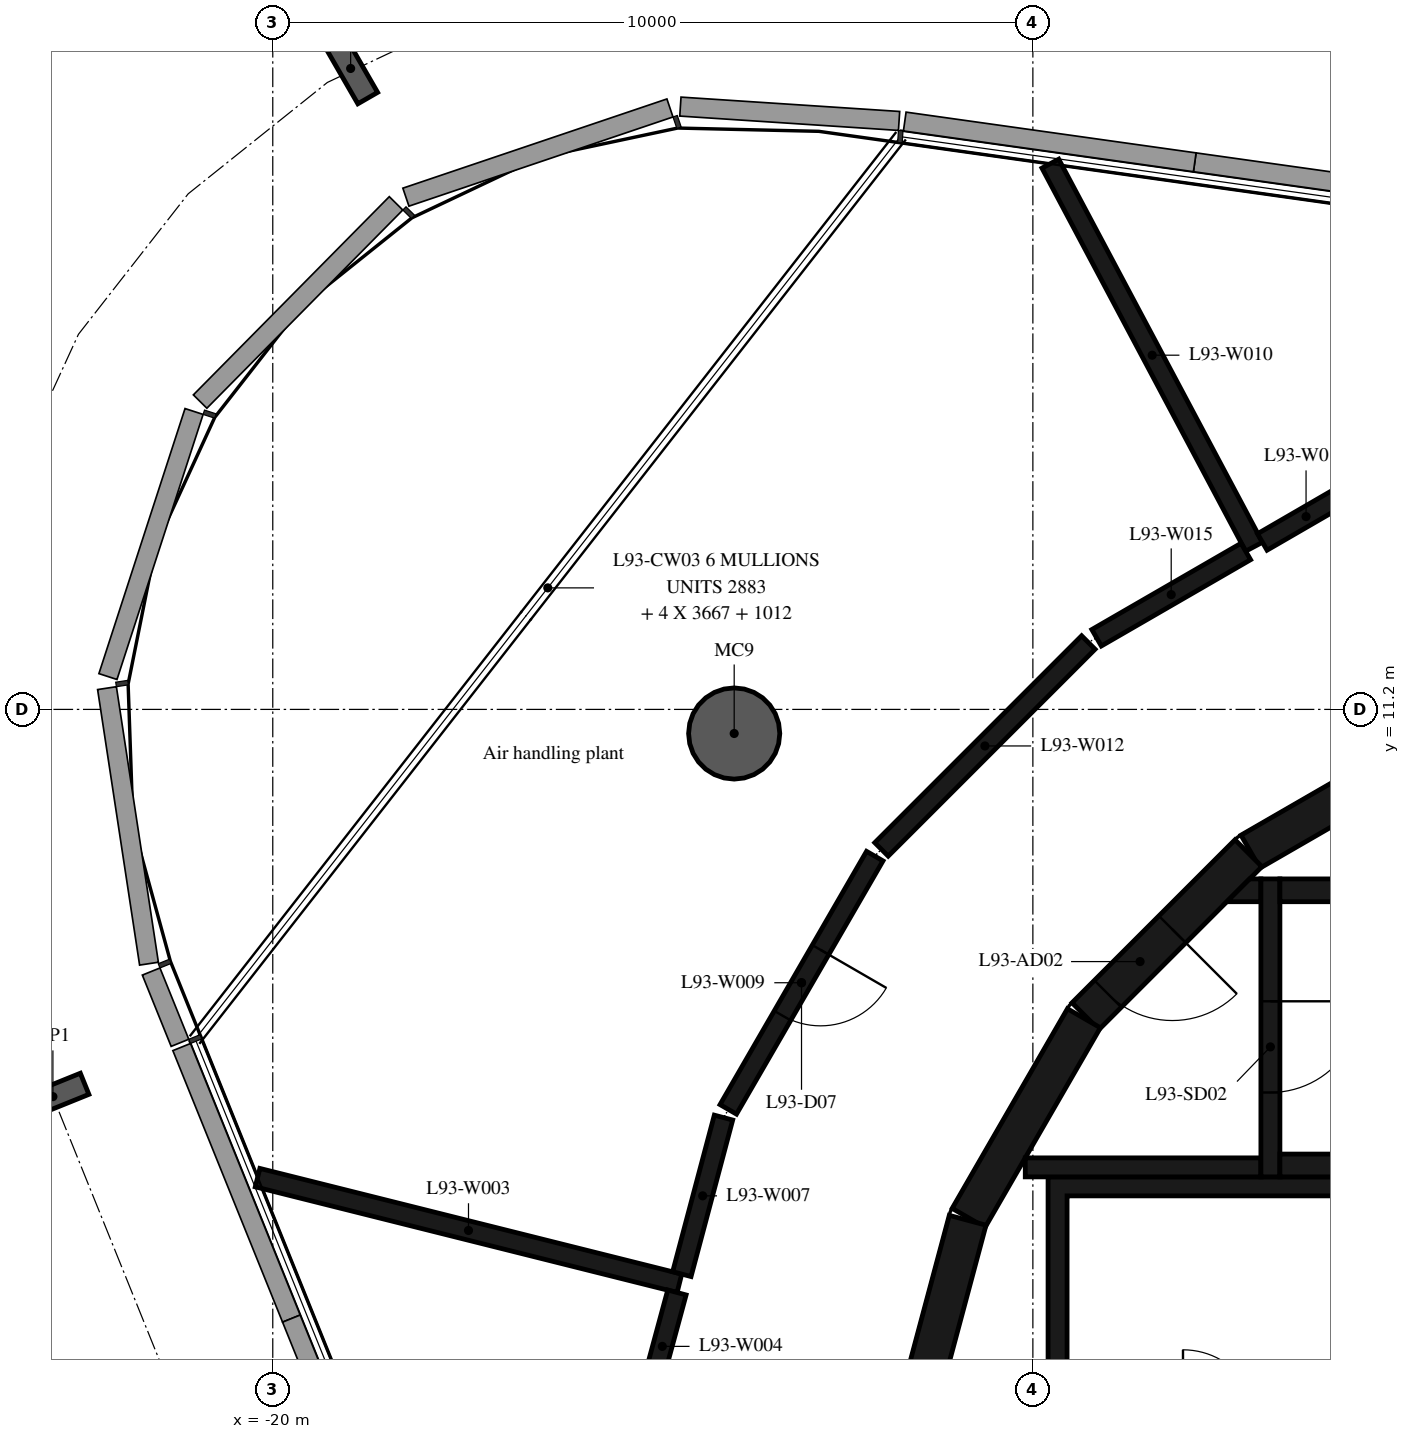
"""IFC4 building model, lengths in metres.
Left out: names, types, materials, properties, quantities, classifications, styles, units other than length and angle.
Written with IfcOpenShell. Run it as: python <this file> out.ifc"""

import sys

from ifc_helpers import new_model, si_unit, direction, frame, frame_2d, origin, origin_2d, place, context, subcontext, project, spatial, polyline, rectangle, hollow_circle, i_section, outline, extrude, element, fill, save


model = new_model("IFC4")
c1 = context("Model", 3, precision=1e-05, world=origin(), true_north=direction((0.0, 1.0)))
c2 = subcontext(c1, "Body", "Model", "MODEL_VIEW")
j1 = project(units=[si_unit("LENGTHUNIT", "METRE"), si_unit("PLANEANGLEUNIT", "RADIAN")], contexts=[c1])
p1 = place(None, origin())
s1 = spatial("IfcSite", under=j1, at=p1, CompositionType="ELEMENT")
p2 = place(p1, origin())
s2 = spatial("IfcBuilding", under=s1, at=p2, CompositionType="ELEMENT")
p3 = place(p2, frame((0.0, 0.0, 361.0)))
s3 = spatial("IfcBuildingStorey", under=s2, at=p3, CompositionType="ELEMENT", Elevation=361.0)
p4 = place(p3, frame((-13.929, 10.883, -0.38), z_axis=(0.0, 0.0, 1.0), x_axis=(1.0, 0.0, 0.0)))
e1 = element("IfcColumn", 1, at=p4, inside=s3, PredefinedType="COLUMN", context=c2, shape_type="SweptSolid", body=[
    extrude(hollow_circle(Radius=0.6, WallThickness=0.03, at=origin_2d()), origin(), (0.0, 0.0, 1.0), 5.2),
])
for number, where, z_axis, x_axis in (
    (2, (-18.976, 19.632, -0.38), (0.0, 0.0, 1.0), (0.866, 0.5, 0.0)),
    (3, (-22.893, 6.106, -0.38), (0.0, 0.0, 1.0), (-0.375, 0.927, 0.0)),
):
    element("IfcColumn", number, at=place(p3, frame(where, z_axis=z_axis, x_axis=x_axis)), inside=s3, PredefinedType="COLUMN", context=c2, shape_type="SweptSolid", body=[
        extrude(i_section(OverallWidth=0.3, OverallDepth=0.9, WebThickness=0.019, FlangeThickness=0.035, FilletRadius=0.03, at=origin_2d()), origin(), (0.0, 0.0, 1.0), 5.2),
    ])
p5 = place(p3, frame((-4.51, 10.845, 0.0), z_axis=(0.0, 0.0, 1.0), x_axis=(-0.865975092491, -0.500087131594, 0.0)))
e4 = element("IfcWall", 4, at=p5, inside=s3, PredefinedType="SHEAR", context=c2, shape_type="SweptSolid", body=[
    extrude(rectangle(XDim=3.033, YDim=0.5, at=frame_2d((1.516, 0.0))), origin(), (0.0, 0.0, 1.0), 4.82),
])
p6 = place(p3, frame((-7.164, 9.308, 0.0), z_axis=(0.0, 0.0, 1.0), x_axis=(-0.707106781187, -0.707106781187, 0.0)))
e5 = element("IfcWall", 5, at=p6, inside=s3, PredefinedType="SHEAR", context=c2, shape_type="SweptSolid", body=[
    extrude(rectangle(XDim=3.032, YDim=0.5, at=frame_2d((1.516, 0.0))), origin(), (0.0, 0.0, 1.0), 4.82),
])
p7 = place(p6, frame((1.416, 0.0, 0.0)))
e6 = element("IfcOpeningElement", 6, at=p7, cuts=e5, PredefinedType="OPENING", context=c2, shape_type="SweptSolid", body=[
    extrude(rectangle(XDim=1.2, YDim=2.1, at=frame_2d((0.6, 1.05))), frame((0.0, 0.26, 0.0), z_axis=(0.0, -1.0, 0.0), x_axis=(1.0, 0.0, 0.0)), (0.0, 0.0, 1.0), 0.52),
])
for number, where, z_axis, x_axis in (
    (7, (-9.329, 7.137, 0.0), (0.0, 0.0, 1.0), (-0.5, -0.866, 0.0)),
    (8, (-10.858, 4.479, 0.0), (0.0, 0.0, 1.0), (-0.259, -0.966, 0.0)),
):
    element("IfcWall", number, at=place(p3, frame(where, z_axis=z_axis, x_axis=x_axis)), inside=s3, PredefinedType="SHEAR", context=c2, shape_type="SweptSolid", body=[
        extrude(rectangle(XDim=3.033, YDim=0.5, at=frame_2d((1.516, 0.0))), origin(), (0.0, 0.0, 1.0), 4.82),
    ])
for number, where, z_axis, x_axis in (
    (9, (-6.75, 5.2, 0.0), (0.0, 0.0, 1.0), (1.0, 0.0, 0.0)),
    (10, (-6.75, 8.82, 0.0), (0.0, 0.0, 1.0), (1.0, 0.0, 0.0)),
):
    element("IfcWall", number, at=place(p3, frame(where, z_axis=z_axis, x_axis=x_axis)), inside=s3, PredefinedType="SHEAR", context=c2, shape_type="SweptSolid", body=[
        extrude(rectangle(XDim=6.75, YDim=0.3, at=frame_2d((3.375, 0.0))), origin(), (0.0, 0.0, 1.0), 4.82),
    ])
p8 = place(p3, frame((-6.875, 8.97, 0.0), z_axis=(0.0, 0.0, 1.0), x_axis=(0.0, -1.0, 0.0)))
e11 = element("IfcWall", 11, at=p8, inside=s3, PredefinedType="SHEAR", context=c2, shape_type="SweptSolid", body=[
    extrude(rectangle(XDim=3.92, YDim=0.25, at=frame_2d((1.96, 0.0))), origin(), (0.0, 0.0, 1.0), 4.82),
])
p9 = place(p8, frame((1.61, 0.0, 0.0)))
e12 = element("IfcOpeningElement", 12, at=p9, cuts=e11, PredefinedType="OPENING", context=c2, shape_type="SweptSolid", body=[
    extrude(rectangle(XDim=1.2, YDim=2.1, at=frame_2d((0.6, 1.05))), frame((0.0, 0.135, 0.0), z_axis=(0.0, -1.0, 0.0), x_axis=(1.0, 0.0, 0.0)), (0.0, 0.0, 1.0), 0.27),
])
p10 = place(p3, frame((-7.0, 5.175, 0.0), z_axis=(0.0, 0.0, 1.0), x_axis=(-1.0, 0.0, 0.0)))
e13 = element("IfcWall", 13, at=p10, inside=s3, PredefinedType="SHEAR", context=c2, shape_type="SweptSolid", body=[
    extrude(rectangle(XDim=3.1, YDim=0.25, at=frame_2d((1.55, 0.0))), origin(), (0.0, 0.0, 1.0), 4.82),
])
p11 = place(p3, origin())
e14 = element("IfcWall", 14, at=p11, inside=s3, PredefinedType="SHEAR", context=c2, shape_type="SweptSolid", body=[
    extrude(outline(polyline([(-7.148, 8.97), (-7.0, 8.97), (-7.0, 8.67), (-7.448, 8.67), (-7.148, 8.97)])), origin(), (0.0, 0.0, 1.0), 4.82),
])
p12 = place(p3, origin())
e15 = element("IfcWall", 15, at=p12, inside=s3, PredefinedType="SHEAR", context=c2, shape_type="SweptSolid", body=[
    extrude(outline(polyline([(-9.8, 1.9), (-9.55, 1.9), (-9.55, 4.8), (-5.5, 4.8), (-5.5, 1.9), (-5.25, 1.9), (-5.25, 4.8), (3.1, 4.8), (3.1, 1.9), (3.35, 1.9), (3.35, 4.8), (5.25, 4.8), (5.25, 1.9), (5.5, 1.9), (5.5, 4.8), (7.4, 4.8), (7.4, 1.9), (7.65, 1.9), (7.65, 4.8), (9.55, 4.8), (9.55, 1.9), (9.8, 1.9), (9.8, 4.8), (9.8, 5.05), (-9.8, 5.05), (-9.8, 4.8), (-9.8, 1.9)])), origin(), (0.0, 0.0, 1.0), 4.82),
])
p13 = place(p3, frame((-14.65, 3.65, 0.0), z_axis=(0.0, 0.0, 1.0), x_axis=(-0.970034472151, 0.242967328748, 0.0)))
e16 = element("IfcWall", 16, at=p13, inside=s3, PredefinedType="PARTITIONING", context=c2, shape_type="SweptSolid", body=[
    extrude(rectangle(XDim=5.721, YDim=0.25, at=frame_2d((2.861, 0.0))), origin(), (0.0, 0.0, 1.0), 4.82),
])
p14 = place(p3, frame((-14.683, 3.529, 0.0), z_axis=(0.0, 0.0, 1.0), x_axis=(-0.261753947787, -0.9651346387, 0.0)))
e17 = element("IfcWall", 17, at=p14, inside=s3, PredefinedType="PARTITIONING", context=c2, shape_type="SweptSolid", body=[
    extrude(rectangle(XDim=1.47, YDim=0.25, at=frame_2d((0.735, 0.0))), origin(), (0.0, 0.0, 1.0), 4.82),
])
p15 = place(p3, frame((-14.07, 5.83, 0.0), z_axis=(0.0, 0.0, 1.0), x_axis=(-0.25709213915, -0.9663868956, 0.0)))
e18 = element("IfcWall", 18, at=p15, inside=s3, PredefinedType="PARTITIONING", context=c2, shape_type="SweptSolid", body=[
    extrude(rectangle(XDim=2.131, YDim=0.25, at=frame_2d((1.065, 0.0))), origin(), (0.0, 0.0, 1.0), 4.82),
])
p16 = place(p3, frame((-12.08, 9.27, 0.0), z_axis=(0.0, 0.0, 1.0), x_axis=(-0.500708693508, -0.865615852585, 0.0)))
e19 = element("IfcWall", 19, at=p16, inside=s3, PredefinedType="PARTITIONING", context=c2, shape_type="SweptSolid", body=[
    extrude(rectangle(XDim=3.849, YDim=0.25, at=frame_2d((1.925, 0.0))), origin(), (0.0, 0.0, 1.0), 4.82),
])
p17 = place(p16, frame((1.425, 0.0, 0.0)))
e20 = element("IfcOpeningElement", 20, at=p17, cuts=e19, PredefinedType="OPENING", context=c2, shape_type="SweptSolid", body=[
    extrude(rectangle(XDim=1.0, YDim=2.1, at=frame_2d((0.5, 1.05))), frame((0.0, 0.135, 0.0), z_axis=(0.0, -1.0, 0.0), x_axis=(1.0, 0.0, 0.0)), (0.0, 0.0, 1.0), 0.27),
])
p18 = place(p3, frame((-9.77, 18.38, 0.0), z_axis=(0.0, 0.0, 1.0), x_axis=(0.469502312853, -0.882931242072, 0.0)))
e21 = element("IfcWall", 21, at=p18, inside=s3, PredefinedType="PARTITIONING", context=c2, shape_type="SweptSolid", body=[
    extrude(rectangle(XDim=5.708, YDim=0.25, at=frame_2d((2.854, 0.0))), origin(), (0.0, 0.0, 1.0), 4.82),
])
p19 = place(p3, frame((-9.27, 12.08, 0.0), z_axis=(0.0, 0.0, 1.0), x_axis=(-0.707106781187, -0.707106781187, 0.0)))
e22 = element("IfcWall", 22, at=p19, inside=s3, PredefinedType="PARTITIONING", context=c2, shape_type="SweptSolid", body=[
    extrude(rectangle(XDim=3.849, YDim=0.25, at=frame_2d((1.925, 0.0))), origin(), (0.0, 0.0, 1.0), 4.82),
])
p20 = place(p3, frame((-7.198, 13.277, 0.0), z_axis=(0.0, 0.0, 1.0), x_axis=(-0.865821548015, -0.500352922439, 0.0)))
e23 = element("IfcWall", 23, at=p20, inside=s3, PredefinedType="PARTITIONING", context=c2, shape_type="SweptSolid", body=[
    extrude(rectangle(XDim=2.268, YDim=0.25, at=frame_2d((1.134, 0.0))), origin(), (0.0, 0.0, 1.0), 4.82),
])
p21 = place(p3, frame((-5.83, 14.07, 0.0), z_axis=(0.0, 0.0, 1.0), x_axis=(-0.865225325987, -0.501383221968, 0.0)))
e24 = element("IfcWall", 24, at=p21, inside=s3, PredefinedType="PARTITIONING", context=c2, shape_type="SweptSolid", body=[
    extrude(rectangle(XDim=1.331, YDim=0.25, at=frame_2d((0.666, 0.0))), origin(), (0.0, 0.0, 1.0), 4.82),
])
p22 = place(p9, origin())
e25 = element("IfcDoor", 25, at=p22, inside=s3, OperationType="SINGLE_SWING_LEFT", PredefinedType="DOOR", context=c2, shape_type="SweptSolid", body=[
    extrude(rectangle(XDim=1.2, YDim=2.1, at=frame_2d((0.6, 1.05))), frame((0.0, 0.025, 0.0), z_axis=(0.0, -1.0, 0.0), x_axis=(1.0, 0.0, 0.0)), (0.0, 0.0, 1.0), 0.05),
])
fill(e12, e25)
p23 = place(p7, origin())
e26 = element("IfcDoor", 26, at=p23, inside=s3, OperationType="SINGLE_SWING_RIGHT", PredefinedType="DOOR", context=c2, shape_type="SweptSolid", body=[
    extrude(rectangle(XDim=1.2, YDim=2.1, at=frame_2d((0.6, 1.05))), frame((0.0, 0.025, 0.0), z_axis=(0.0, -1.0, 0.0), x_axis=(1.0, 0.0, 0.0)), (0.0, 0.0, 1.0), 0.05),
])
fill(e6, e26)
p24 = place(p17, origin())
e27 = element("IfcDoor", 27, at=p24, inside=s3, OperationType="SINGLE_SWING_LEFT", PredefinedType="DOOR", context=c2, shape_type="SweptSolid", body=[
    extrude(rectangle(XDim=1.0, YDim=2.1, at=frame_2d((0.5, 1.05))), frame((0.0, 0.025, 0.0), z_axis=(0.0, -1.0, 0.0), x_axis=(1.0, 0.0, 0.0)), (0.0, 0.0, 1.0), 0.05),
])
fill(e20, e27)
save(model, sys.argv[1])
